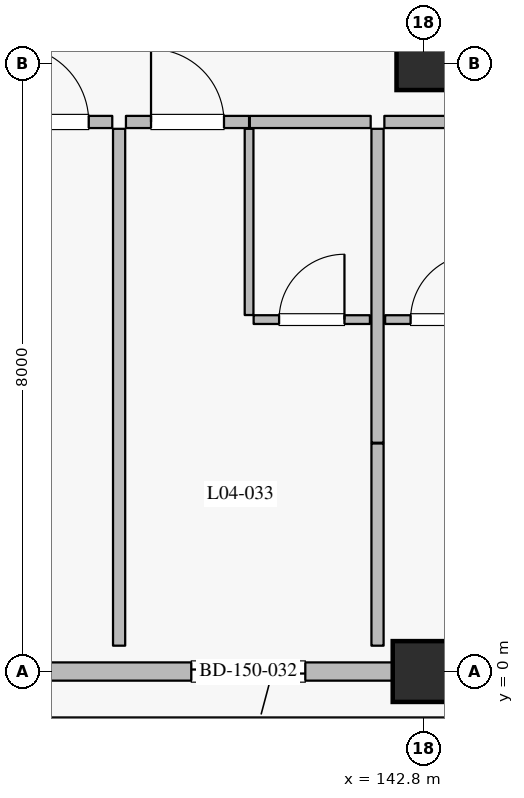
"""IFC4 building model, lengths in metres.
Left out: names, types, materials, properties, quantities, classifications, styles, units other than length and angle.
Written with IfcOpenShell. Run it as: python <this file> out.ifc"""

import sys

from ifc_helpers import new_model, si_unit, direction, frame, frame_2d, origin, origin_2d, place, context, subcontext, project, spatial, rectangle, extrude, element, fill, save


model = new_model("IFC4")
c1 = context("Model", 3, precision=1e-05, world=origin(), true_north=direction((0.0, 1.0)))
c2 = subcontext(c1, "Body", "Model", "MODEL_VIEW")
j1 = project(units=[si_unit("LENGTHUNIT", "METRE"), si_unit("PLANEANGLEUNIT", "RADIAN")], contexts=[c1])
p1 = place(None, origin())
s1 = spatial("IfcSite", under=j1, at=p1, CompositionType="ELEMENT")
p2 = place(p1, origin())
s2 = spatial("IfcBuilding", under=s1, at=p2, CompositionType="ELEMENT")
p3 = place(p2, frame((0.0, 0.0, 21.0)))
s3 = spatial("IfcBuildingStorey", under=s2, at=p3, CompositionType="ELEMENT", Elevation=21.0)
p4 = place(p3, frame((142.8, 0.0, 0.0), z_axis=(0.0, 0.0, 1.0), x_axis=(1.0, 0.0, 0.0)))
e1 = element("IfcColumn", 1, at=p4, inside=s3, PredefinedType="COLUMN", context=c2, shape_type="SweptSolid", body=[
    extrude(rectangle(XDim=0.8, YDim=0.8, at=origin_2d()), origin(), (0.0, 0.0, 1.0), 4.2),
])
p5 = place(p3, frame((142.8, 8.0, 0.0), z_axis=(0.0, 0.0, 1.0), x_axis=(1.0, 0.0, 0.0)))
e2 = element("IfcColumn", 2, at=p5, inside=s3, PredefinedType="COLUMN", context=c2, shape_type="SweptSolid", body=[
    extrude(rectangle(XDim=0.7, YDim=0.7, at=origin_2d()), origin(), (0.0, 0.0, 1.0), 4.2),
])
p6 = place(p3, frame((142.4, 0.0, 0.0), z_axis=(0.0, 0.0, 1.0), x_axis=(-1.0, 0.0, 0.0)))
e3 = element("IfcWall", 3, at=p6, inside=s3, PredefinedType="SOLIDWALL", context=c2, shape_type="SweptSolid", body=[
    extrude(rectangle(XDim=7.6, YDim=0.24, at=frame_2d((3.8, 0.0))), origin(), (0.0, 0.0, 1.0), 3.53),
])
p7 = place(p6, frame((1.15, 0.0, 0.0)))
e4 = element("IfcOpeningElement", 4, at=p7, cuts=e3, PredefinedType="OPENING", context=c2, shape_type="SweptSolid", body=[
    extrude(rectangle(XDim=1.5, YDim=2.25, at=frame_2d((0.75, 1.125))), frame((0.0, 0.13, 0.0), z_axis=(0.0, -1.0, 0.0), x_axis=(1.0, 0.0, 0.0)), (0.0, 0.0, 1.0), 0.26),
])
p8 = place(p6, frame((4.5, 0.0, 0.8)))
e5 = element("IfcOpeningElement", 5, at=p8, cuts=e3, PredefinedType="OPENING", context=c2, shape_type="SweptSolid", body=[
    extrude(rectangle(XDim=1.6, YDim=1.6, at=frame_2d((0.8, 0.8))), frame((0.0, 0.13, 0.0), z_axis=(0.0, -1.0, 0.0), x_axis=(1.0, 0.0, 0.0)), (0.0, 0.0, 1.0), 0.26),
])
p9 = place(p3, frame((137.09, 7.23, 0.0), z_axis=(0.0, 0.0, 1.0), x_axis=(1.0, 0.0, 0.0)))
e6 = element("IfcWall", 6, at=p9, inside=s3, PredefinedType="PARTITIONING", context=c2, shape_type="SweptSolid", body=[
    extrude(rectangle(XDim=1.62, YDim=0.16, at=frame_2d((0.81, 0.0))), origin(), (0.0, 0.0, 1.0), 3.965),
])
p10 = place(p9, frame((0.31, 0.0, 0.0)))
e7 = element("IfcOpeningElement", 7, at=p10, cuts=e6, PredefinedType="OPENING", context=c2, shape_type="SweptSolid", body=[
    extrude(rectangle(XDim=1.0, YDim=2.25, at=frame_2d((0.5, 1.125))), frame((0.0, 0.09, 0.0), z_axis=(0.0, -1.0, 0.0), x_axis=(1.0, 0.0, 0.0)), (0.0, 0.0, 1.0), 0.18),
])
p11 = place(p3, frame((138.89, 7.23, 0.0), z_axis=(0.0, 0.0, 1.0), x_axis=(1.0, 0.0, 0.0)))
e8 = element("IfcWall", 8, at=p11, inside=s3, PredefinedType="PARTITIONING", context=c2, shape_type="SweptSolid", body=[
    extrude(rectangle(XDim=1.62, YDim=0.16, at=frame_2d((0.81, 0.0))), origin(), (0.0, 0.0, 1.0), 3.965),
])
p12 = place(p11, frame((0.33, 0.0, 0.0)))
e9 = element("IfcOpeningElement", 9, at=p12, cuts=e8, PredefinedType="OPENING", context=c2, shape_type="SweptSolid", body=[
    extrude(rectangle(XDim=0.96, YDim=2.2, at=frame_2d((0.48, 1.1))), frame((0.0, 0.09, 0.0), z_axis=(0.0, -1.0, 0.0), x_axis=(1.0, 0.0, 0.0)), (0.0, 0.0, 1.0), 0.18),
])
p13 = place(p3, frame((140.52, 7.23, 0.0), z_axis=(0.0, 0.0, 1.0), x_axis=(1.0, 0.0, 0.0)))
e10 = element("IfcWall", 10, at=p13, inside=s3, PredefinedType="PARTITIONING", context=c2, shape_type="SweptSolid", body=[
    extrude(rectangle(XDim=1.59, YDim=0.16, at=frame_2d((0.795, 0.0))), origin(), (0.0, 0.0, 1.0), 3.965),
])
p14 = place(p3, frame((140.51, 4.69, 0.0), z_axis=(0.0, 0.0, 1.0), x_axis=(0.0, 1.0, 0.0)))
e11 = element("IfcWall", 11, at=p14, inside=s3, PredefinedType="PARTITIONING", context=c2, shape_type="SweptSolid", body=[
    extrude(rectangle(XDim=2.45, YDim=0.115, at=frame_2d((1.225, 0.0))), origin(), (0.0, 0.0, 1.0), 3.965),
])
p15 = place(p3, frame((140.57, 4.63, 0.0), z_axis=(0.0, 0.0, 1.0), x_axis=(1.0, 0.0, 0.0)))
e12 = element("IfcWall", 12, at=p15, inside=s3, PredefinedType="PARTITIONING", context=c2, shape_type="SweptSolid", body=[
    extrude(rectangle(XDim=1.53, YDim=0.115, at=frame_2d((0.765, 0.0))), origin(), (0.0, 0.0, 1.0), 3.965),
])
p16 = place(p15, frame((0.335, 0.0, 0.0)))
e13 = element("IfcOpeningElement", 13, at=p16, cuts=e12, PredefinedType="OPENING", context=c2, shape_type="SweptSolid", body=[
    extrude(rectangle(XDim=0.86, YDim=2.12, at=frame_2d((0.43, 1.06))), frame((0.0, 0.067, 0.0), z_axis=(0.0, -1.0, 0.0), x_axis=(1.0, 0.0, 0.0)), (0.0, 0.0, 1.0), 0.135),
])
p17 = place(p3, frame((138.8, 0.34, 0.0), z_axis=(0.0, 0.0, 1.0), x_axis=(0.0, 1.0, 0.0)))
e14 = element("IfcWall", 14, at=p17, inside=s3, PredefinedType="PARTITIONING", context=c2, shape_type="SweptSolid", body=[
    extrude(rectangle(XDim=6.8, YDim=0.16, at=frame_2d((3.4, 0.0))), origin(), (0.0, 0.0, 1.0), 3.965),
])
p18 = place(p3, frame((142.2, 0.34, 0.0), z_axis=(0.0, 0.0, 1.0), x_axis=(0.0, 1.0, 0.0)))
e15 = element("IfcWall", 15, at=p18, inside=s3, PredefinedType="PARTITIONING", context=c2, shape_type="SweptSolid", body=[
    extrude(rectangle(XDim=2.66, YDim=0.16, at=frame_2d((1.33, 0.0))), origin(), (0.0, 0.0, 1.0), 3.965),
])
p19 = place(p3, frame((142.29, 7.23, 0.0), z_axis=(0.0, 0.0, 1.0), x_axis=(1.0, 0.0, 0.0)))
e16 = element("IfcWall", 16, at=p19, inside=s3, PredefinedType="PARTITIONING", context=c2, shape_type="SweptSolid", body=[
    extrude(rectangle(XDim=1.59, YDim=0.16, at=frame_2d((0.795, 0.0))), origin(), (0.0, 0.0, 1.0), 3.965),
])
p20 = place(p3, frame((142.3, 4.63, 0.0), z_axis=(0.0, 0.0, 1.0), x_axis=(1.0, 0.0, 0.0)))
e17 = element("IfcWall", 17, at=p20, inside=s3, PredefinedType="PARTITIONING", context=c2, shape_type="SweptSolid", body=[
    extrude(rectangle(XDim=1.53, YDim=0.115, at=frame_2d((0.765, 0.0))), origin(), (0.0, 0.0, 1.0), 3.965),
])
p21 = place(p20, frame((0.335, 0.0, 0.0)))
e18 = element("IfcOpeningElement", 18, at=p21, cuts=e17, PredefinedType="OPENING", context=c2, shape_type="SweptSolid", body=[
    extrude(rectangle(XDim=0.86, YDim=2.12, at=frame_2d((0.43, 1.06))), frame((0.0, 0.067, 0.0), z_axis=(0.0, -1.0, 0.0), x_axis=(1.0, 0.0, 0.0)), (0.0, 0.0, 1.0), 0.135),
])
p22 = place(p3, frame((142.2, 3.01, 0.0), z_axis=(0.0, 0.0, 1.0), x_axis=(0.0, 1.0, 0.0)))
e19 = element("IfcWall", 19, at=p22, inside=s3, PredefinedType="PARTITIONING", context=c2, shape_type="SweptSolid", body=[
    extrude(rectangle(XDim=4.13, YDim=0.16, at=frame_2d((2.065, 0.0))), origin(), (0.0, 0.0, 1.0), 3.965),
])
p23 = place(p7, origin())
e20 = element("IfcDoor", 20, at=p23, inside=s3, OperationType="SLIDING_TO_LEFT", PredefinedType="DOOR", context=c2, shape_type="SweptSolid", body=[
    extrude(rectangle(XDim=1.5, YDim=2.25, at=frame_2d((0.75, 1.125))), frame((0.0, 0.025, 0.0), z_axis=(0.0, -1.0, 0.0), x_axis=(1.0, 0.0, 0.0)), (0.0, 0.0, 1.0), 0.05),
])
fill(e4, e20)
p24 = place(p10, origin())
e21 = element("IfcDoor", 21, at=p24, inside=s3, OperationType="SINGLE_SWING_LEFT", PredefinedType="DOOR", context=c2, shape_type="SweptSolid", body=[
    extrude(rectangle(XDim=1.0, YDim=2.25, at=frame_2d((0.5, 1.125))), frame((0.0, 0.025, 0.0), z_axis=(0.0, -1.0, 0.0), x_axis=(1.0, 0.0, 0.0)), (0.0, 0.0, 1.0), 0.05),
])
fill(e7, e21)
p25 = place(p12, origin())
e22 = element("IfcDoor", 22, at=p25, inside=s3, OperationType="SINGLE_SWING_LEFT", PredefinedType="DOOR", context=c2, shape_type="SweptSolid", body=[
    extrude(rectangle(XDim=0.96, YDim=2.2, at=frame_2d((0.48, 1.1))), frame((0.0, 0.025, 0.0), z_axis=(0.0, -1.0, 0.0), x_axis=(1.0, 0.0, 0.0)), (0.0, 0.0, 1.0), 0.05),
])
fill(e9, e22)
p26 = place(p16, origin())
e23 = element("IfcDoor", 23, at=p26, inside=s3, OperationType="SINGLE_SWING_RIGHT", PredefinedType="DOOR", context=c2, shape_type="SweptSolid", body=[
    extrude(rectangle(XDim=0.86, YDim=2.12, at=frame_2d((0.43, 1.06))), frame((0.0, 0.025, 0.0), z_axis=(0.0, -1.0, 0.0), x_axis=(1.0, 0.0, 0.0)), (0.0, 0.0, 1.0), 0.05),
])
fill(e13, e23)
p27 = place(p21, origin())
e24 = element("IfcDoor", 24, at=p27, inside=s3, OperationType="SINGLE_SWING_RIGHT", PredefinedType="DOOR", context=c2, shape_type="SweptSolid", body=[
    extrude(rectangle(XDim=0.86, YDim=2.12, at=frame_2d((0.43, 1.06))), frame((0.0, 0.025, 0.0), z_axis=(0.0, -1.0, 0.0), x_axis=(1.0, 0.0, 0.0)), (0.0, 0.0, 1.0), 0.05),
])
fill(e18, e24)
save(model, sys.argv[1])
